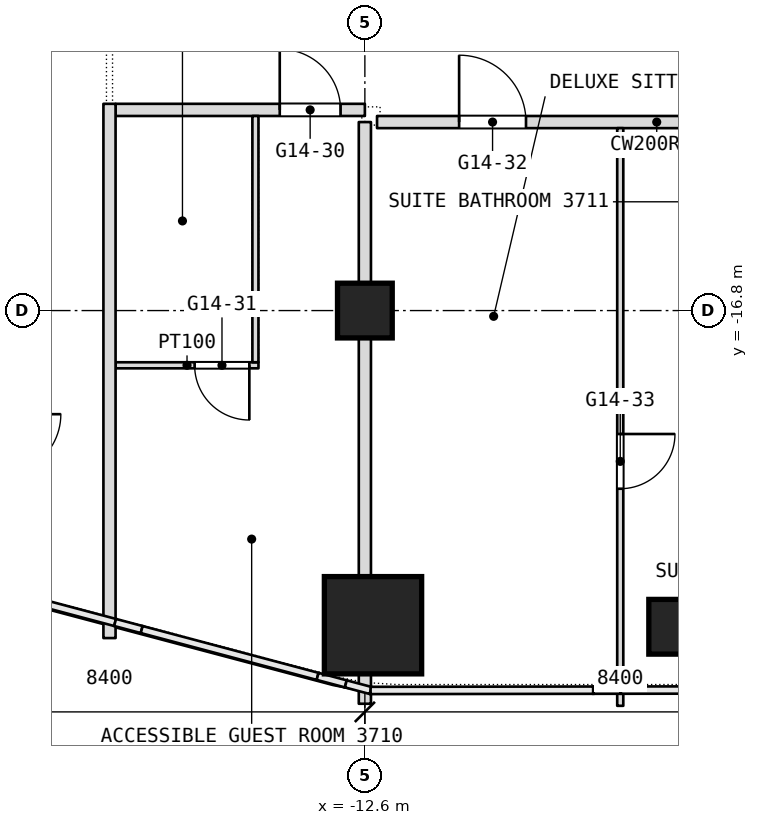
"""IFC4 building model, lengths in metres.
Left out: names, types, materials, properties, quantities, classifications, styles, units other than length and angle.
Written with IfcOpenShell. Run it as: python <this file> out.ifc"""

import sys

from ifc_helpers import new_model, si_unit, direction, frame, frame_2d, origin, origin_2d, place, context, subcontext, project, spatial, rectangle, extrude, element, fill, save


model = new_model("IFC4")
c1 = context("Model", 3, precision=1e-05, world=origin(), true_north=direction((0.0, 1.0)))
c2 = subcontext(c1, "Body", "Model", "MODEL_VIEW")
j1 = project(units=[si_unit("LENGTHUNIT", "METRE"), si_unit("PLANEANGLEUNIT", "RADIAN")], contexts=[c1])
p1 = place(None, origin())
s1 = spatial("IfcSite", under=j1, at=p1, CompositionType="ELEMENT")
p2 = place(p1, origin())
s2 = spatial("IfcBuilding", under=s1, at=p2, CompositionType="ELEMENT")
p3 = place(p2, frame((0.0, 0.0, 158.9)))
s3 = spatial("IfcBuildingStorey", under=s2, at=p3, CompositionType="ELEMENT", Elevation=158.9)
p4 = place(p3, frame((-12.466, -21.975, 0.0), z_axis=(0.0, 0.0, 1.0), x_axis=(1.0, 0.0, 0.0)))
e1 = element("IfcColumn", 1, at=p4, inside=s3, PredefinedType="COLUMN", context=c2, shape_type="SweptSolid", body=[
    extrude(rectangle(XDim=1.6, YDim=1.6, at=origin_2d()), origin(), (0.0, 0.0, 1.0), 3.6),
])
for number, where, z_axis, x_axis in (
    (2, (-12.6, -16.8, 0.0), (0.0, 0.0, 1.0), (1.0, 0.0, 0.0)),
    (3, (-7.48, -22.0, 0.0), (0.0, 0.0, 1.0), (1.0, 0.0, 0.0)),
):
    element("IfcColumn", number, at=place(p3, frame(where, z_axis=z_axis, x_axis=x_axis)), inside=s3, PredefinedType="COLUMN", context=c2, shape_type="SweptSolid", body=[
        extrude(rectangle(XDim=0.9, YDim=0.9, at=origin_2d()), origin(), (0.0, 0.0, 1.0), 3.6),
    ])
p5 = place(p3, frame((-16.7, -17.7, 0.0), z_axis=(0.0, 0.0, 1.0), x_axis=(1.0, 0.0, 0.0)))
e4 = element("IfcWall", 4, at=p5, inside=s3, PredefinedType="PARTITIONING", context=c2, shape_type="SweptSolid", body=[
    extrude(rectangle(XDim=2.35, YDim=0.1, at=frame_2d((1.175, 0.0))), origin(), (0.0, 0.0, 1.0), 3.34),
])
p6 = place(p5, frame((1.3, 0.0, 0.0)))
e5 = element("IfcOpeningElement", 5, at=p6, cuts=e4, PredefinedType="OPENING", context=c2, shape_type="SweptSolid", body=[
    extrude(rectangle(XDim=0.9, YDim=2.1, at=frame_2d((0.45, 1.05))), frame((0.0, 0.05, 0.0), z_axis=(0.0, -1.0, 0.0), x_axis=(1.0, 0.0, 0.0)), (0.0, 0.0, 1.0), 0.1),
])
p7 = place(p3, frame((-12.4, -13.7, 0.0), z_axis=(0.0, 0.0, 1.0), x_axis=(1.0, 0.0, 0.0)))
e6 = element("IfcWall", 6, at=p7, inside=s3, PredefinedType="PARTITIONING", context=c2, shape_type="SweptSolid", body=[
    extrude(rectangle(XDim=9.2, YDim=0.2, at=frame_2d((4.6, 0.0))), origin(), (0.0, 0.0, 1.0), 3.34),
])
p8 = place(p7, frame((1.35, 0.0, 0.0)))
e7 = element("IfcOpeningElement", 7, at=p8, cuts=e6, PredefinedType="OPENING", context=c2, shape_type="SweptSolid", body=[
    extrude(rectangle(XDim=1.1, YDim=2.1, at=frame_2d((0.55, 1.05))), frame((0.0, 0.1, 0.0), z_axis=(0.0, -1.0, 0.0), x_axis=(1.0, 0.0, 0.0)), (0.0, 0.0, 1.0), 0.2),
])
p9 = place(p3, frame((-16.7, -13.5, 0.0), z_axis=(0.0, 0.0, 1.0), x_axis=(1.0, 0.0, 0.0)))
e8 = element("IfcWall", 8, at=p9, inside=s3, PredefinedType="PARTITIONING", context=c2, shape_type="SweptSolid", body=[
    extrude(rectangle(XDim=4.1, YDim=0.2, at=frame_2d((2.05, 0.0))), origin(), (0.0, 0.0, 1.0), 3.34),
])
p10 = place(p9, frame((2.7, 0.0, 0.0)))
e9 = element("IfcOpeningElement", 9, at=p10, cuts=e8, PredefinedType="OPENING", context=c2, shape_type="SweptSolid", body=[
    extrude(rectangle(XDim=1.0, YDim=2.1, at=frame_2d((0.5, 1.05))), frame((0.0, 0.1, 0.0), z_axis=(0.0, -1.0, 0.0), x_axis=(1.0, 0.0, 0.0)), (0.0, 0.0, 1.0), 0.2),
])
p11 = place(p3, frame((-8.4, -23.3, 0.0), z_axis=(0.0, 0.0, 1.0), x_axis=(0.0, 1.0, 0.0)))
e10 = element("IfcWall", 10, at=p11, inside=s3, PredefinedType="PARTITIONING", context=c2, shape_type="SweptSolid", body=[
    extrude(rectangle(XDim=9.5, YDim=0.1, at=frame_2d((4.75, 0.0))), origin(), (0.0, 0.0, 1.0), 3.34),
])
p12 = place(p11, frame((3.57, 0.0, 0.0)))
e11 = element("IfcOpeningElement", 11, at=p12, cuts=e10, PredefinedType="OPENING", context=c2, shape_type="SweptSolid", body=[
    extrude(rectangle(XDim=0.9, YDim=2.1, at=frame_2d((0.45, 1.05))), frame((0.0, 0.05, 0.0), z_axis=(0.0, -1.0, 0.0), x_axis=(1.0, 0.0, 0.0)), (0.0, 0.0, 1.0), 0.1),
])
p13 = place(p3, frame((-12.6, -23.266, 0.0), z_axis=(0.0, 0.0, 1.0), x_axis=(0.0, 1.0, 0.0)))
e12 = element("IfcWall", 12, at=p13, inside=s3, PredefinedType="PARTITIONING", context=c2, shape_type="SweptSolid", body=[
    extrude(rectangle(XDim=0.491, YDim=0.2, at=frame_2d((0.246, 0.0))), origin(), (0.0, 0.0, 1.0), 3.34),
])
p14 = place(p3, frame((-12.6, -21.175, 0.0), z_axis=(0.0, 0.0, 1.0), x_axis=(0.0, 1.0, 0.0)))
e13 = element("IfcWall", 13, at=p14, inside=s3, PredefinedType="PARTITIONING", context=c2, shape_type="SweptSolid", body=[
    extrude(rectangle(XDim=7.475, YDim=0.2, at=frame_2d((3.738, 0.0))), origin(), (0.0, 0.0, 1.0), 3.34),
])
p15 = place(p3, frame((-14.4, -17.65, 0.0), z_axis=(0.0, 0.0, 1.0), x_axis=(0.0, 1.0, 0.0)))
e14 = element("IfcWall", 14, at=p15, inside=s3, PredefinedType="PARTITIONING", context=c2, shape_type="SweptSolid", body=[
    extrude(rectangle(XDim=4.05, YDim=0.1, at=frame_2d((2.025, 0.0))), origin(), (0.0, 0.0, 1.0), 3.34),
])
p16 = place(p3, frame((-16.8, -22.186, 0.0), z_axis=(0.0, 0.0, 1.0), x_axis=(0.0, 1.0, 0.0)))
e15 = element("IfcWall", 15, at=p16, inside=s3, PredefinedType="PARTITIONING", context=c2, shape_type="SweptSolid", body=[
    extrude(rectangle(XDim=8.786, YDim=0.2, at=frame_2d((4.393, 0.0))), origin(), (0.0, 0.0, 1.0), 3.34),
])
p17 = place(p6, origin())
e16 = element("IfcDoor", 16, at=p17, inside=s3, OperationType="SINGLE_SWING_RIGHT", PredefinedType="DOOR", context=c2, shape_type="SweptSolid", body=[
    extrude(rectangle(XDim=0.9, YDim=2.1, at=frame_2d((0.45, 1.05))), frame((0.0, 0.025, 0.0), z_axis=(0.0, -1.0, 0.0), x_axis=(1.0, 0.0, 0.0)), (0.0, 0.0, 1.0), 0.05),
])
fill(e5, e16)
p18 = place(p8, origin())
e17 = element("IfcDoor", 17, at=p18, inside=s3, OperationType="SINGLE_SWING_RIGHT", PredefinedType="DOOR", context=c2, shape_type="SweptSolid", body=[
    extrude(rectangle(XDim=1.1, YDim=2.1, at=frame_2d((0.55, 1.05))), frame((0.0, 0.025, 0.0), z_axis=(0.0, -1.0, 0.0), x_axis=(1.0, 0.0, 0.0)), (0.0, 0.0, 1.0), 0.05),
])
fill(e7, e17)
p19 = place(p10, origin())
e18 = element("IfcDoor", 18, at=p19, inside=s3, OperationType="SINGLE_SWING_RIGHT", PredefinedType="DOOR", context=c2, shape_type="SweptSolid", body=[
    extrude(rectangle(XDim=1.0, YDim=2.1, at=frame_2d((0.5, 1.05))), frame((0.0, 0.025, 0.0), z_axis=(0.0, -1.0, 0.0), x_axis=(1.0, 0.0, 0.0)), (0.0, 0.0, 1.0), 0.05),
])
fill(e9, e18)
p20 = place(p12, origin())
e19 = element("IfcDoor", 19, at=p20, inside=s3, OperationType="SINGLE_SWING_RIGHT", PredefinedType="DOOR", context=c2, shape_type="SweptSolid", body=[
    extrude(rectangle(XDim=0.9, YDim=2.1, at=frame_2d((0.45, 1.05))), frame((0.0, 0.025, 0.0), z_axis=(0.0, -1.0, 0.0), x_axis=(1.0, 0.0, 0.0)), (0.0, 0.0, 1.0), 0.05),
])
fill(e11, e19)
save(model, sys.argv[1])
